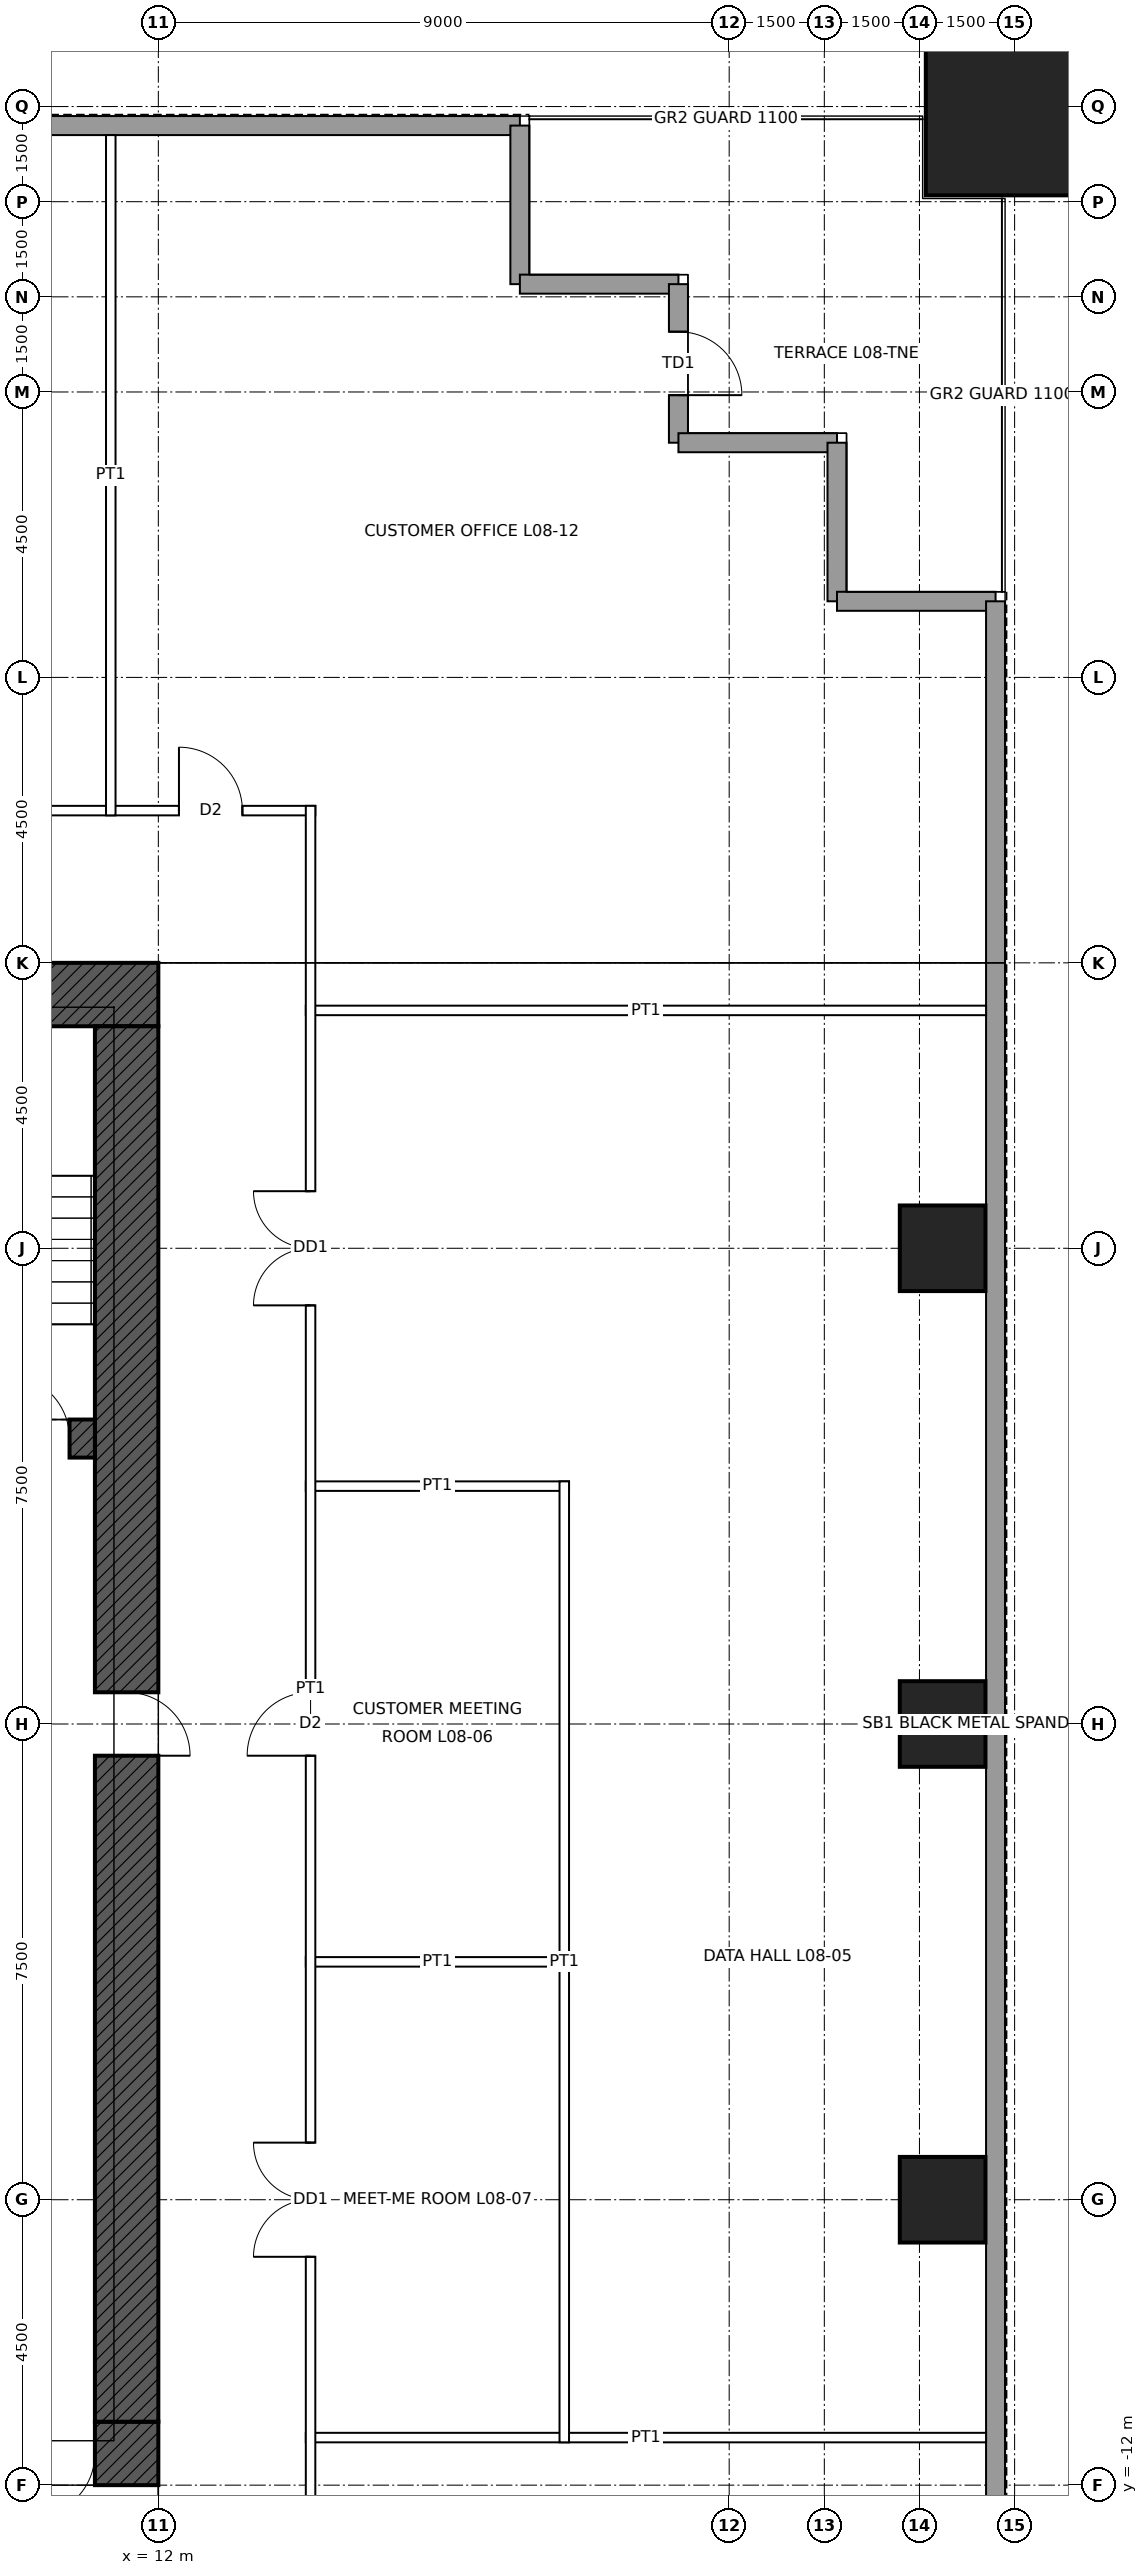
"""IFC4 building model, lengths in metres.
Left out: names, types, materials, properties, quantities, classifications, styles, units other than length and angle.
Written with IfcOpenShell. Run it as: python <this file> out.ifc"""

import sys

from ifc_helpers import new_model, si_unit, direction, frame, frame_2d, origin, origin_2d, place, context, subcontext, project, spatial, rectangle, hollow_rectangle, extrude, element, fill, save


model = new_model("IFC4")
c1 = context("Model", 3, precision=1e-05, world=origin(), true_north=direction((0.0, 1.0)))
c2 = subcontext(c1, "Body", "Model", "MODEL_VIEW")
j1 = project(units=[si_unit("LENGTHUNIT", "METRE"), si_unit("PLANEANGLEUNIT", "RADIAN")], contexts=[c1])
p1 = place(None, origin())
s1 = spatial("IfcSite", under=j1, at=p1, CompositionType="ELEMENT")
p2 = place(p1, origin())
s2 = spatial("IfcBuilding", under=s1, at=p2, CompositionType="ELEMENT")
p3 = place(p2, frame((0.0, 0.0, 43.4)))
s3 = spatial("IfcBuildingStorey", under=s2, at=p3, CompositionType="ELEMENT", Elevation=43.4)
p4 = place(p3, frame((25.5, 25.5, 0.0), z_axis=(0.0, 0.0, 1.0), x_axis=(1.0, 0.0, 0.0)))
e1 = element("IfcColumn", 1, at=p4, inside=s3, PredefinedType="COLUMN", context=c2, shape_type="SweptSolid", body=[
    extrude(hollow_rectangle(XDim=2.8, YDim=2.8, WallThickness=0.14, at=origin_2d()), origin(), (0.0, 0.0, 1.0), 5.0),
])
for number, where, z_axis, x_axis in (
    (2, (24.365, 7.5, 0.0), (0.0, 0.0, 1.0), (1.0, 0.0, 0.0)),
    (3, (24.365, 0.0, 0.0), (0.0, 0.0, 1.0), (1.0, 0.0, 0.0)),
    (4, (24.365, -7.5, 0.0), (0.0, 0.0, 1.0), (1.0, 0.0, 0.0)),
):
    element("IfcColumn", number, at=place(p3, frame(where, z_axis=z_axis, x_axis=x_axis)), inside=s3, PredefinedType="COLUMN", context=c2, shape_type="SweptSolid", body=[
        extrude(hollow_rectangle(XDim=1.35, YDim=1.35, WallThickness=0.085, at=origin_2d()), origin(), (0.0, 0.0, 1.0), 5.0),
    ])
p5 = place(p3, frame((-12.0, 11.5, 0.0), z_axis=(0.0, 0.0, 1.0), x_axis=(1.0, 0.0, 0.0)))
e5 = element("IfcWall", 5, at=p5, inside=s3, PredefinedType="SHEAR", context=c2, shape_type="SweptSolid", body=[
    extrude(rectangle(XDim=24.0, YDim=1.0, at=frame_2d((12.0, 0.0))), origin(), (0.0, 0.0, 1.0), 5.0),
])
p6 = place(p5, frame((6.25, 0.0, 0.0)))
e6 = element("IfcOpeningElement", 6, at=p6, cuts=e5, PredefinedType="OPENING", context=c2, shape_type="SweptSolid", body=[
    extrude(rectangle(XDim=1.0, YDim=2.4, at=frame_2d((0.5, 1.2))), frame((0.0, 0.51, 0.0), z_axis=(0.0, -1.0, 0.0), x_axis=(1.0, 0.0, 0.0)), (0.0, 0.0, 1.0), 1.02),
])
p7 = place(p5, frame((16.75, 0.0, 0.0)))
e7 = element("IfcOpeningElement", 7, at=p7, cuts=e5, PredefinedType="OPENING", context=c2, shape_type="SweptSolid", body=[
    extrude(rectangle(XDim=1.0, YDim=2.4, at=frame_2d((0.5, 1.2))), frame((0.0, 0.51, 0.0), z_axis=(0.0, -1.0, 0.0), x_axis=(1.0, 0.0, 0.0)), (0.0, 0.0, 1.0), 1.02),
])
p8 = place(p3, frame((12.0, -11.5, 0.0), z_axis=(0.0, 0.0, 1.0), x_axis=(-1.0, 0.0, 0.0)))
e8 = element("IfcWall", 8, at=p8, inside=s3, PredefinedType="SHEAR", context=c2, shape_type="SweptSolid", body=[
    extrude(rectangle(XDim=24.0, YDim=1.0, at=frame_2d((12.0, 0.0))), origin(), (0.0, 0.0, 1.0), 5.0),
])
p9 = place(p8, frame((11.5, 0.0, 0.0)))
e9 = element("IfcOpeningElement", 9, at=p9, cuts=e8, PredefinedType="OPENING", context=c2, shape_type="SweptSolid", body=[
    extrude(rectangle(XDim=1.0, YDim=2.1, at=frame_2d((0.5, 1.05))), frame((0.0, 0.51, 0.0), z_axis=(0.0, -1.0, 0.0), x_axis=(1.0, 0.0, 0.0)), (0.0, 0.0, 1.0), 1.02),
])
p10 = place(p8, frame((1.0, 0.0, 0.0)))
e10 = element("IfcOpeningElement", 10, at=p10, cuts=e8, PredefinedType="OPENING", context=c2, shape_type="SweptSolid", body=[
    extrude(rectangle(XDim=1.0, YDim=2.4, at=frame_2d((0.5, 1.2))), frame((0.0, 0.51, 0.0), z_axis=(0.0, -1.0, 0.0), x_axis=(1.0, 0.0, 0.0)), (0.0, 0.0, 1.0), 1.02),
])
p11 = place(p3, frame((11.5, 11.0, 0.0), z_axis=(0.0, 0.0, 1.0), x_axis=(0.0, -1.0, 0.0)))
e11 = element("IfcWall", 11, at=p11, inside=s3, PredefinedType="SHEAR", context=c2, shape_type="SweptSolid", body=[
    extrude(rectangle(XDim=22.0, YDim=1.0, at=frame_2d((11.0, 0.0))), origin(), (0.0, 0.0, 1.0), 5.0),
])
p12 = place(p11, frame((10.5, 0.0, 0.0)))
e12 = element("IfcOpeningElement", 12, at=p12, cuts=e11, PredefinedType="OPENING", context=c2, shape_type="SweptSolid", body=[
    extrude(rectangle(XDim=1.0, YDim=2.4, at=frame_2d((0.5, 1.2))), frame((0.0, 0.51, 0.0), z_axis=(0.0, -1.0, 0.0), x_axis=(1.0, 0.0, 0.0)), (0.0, 0.0, 1.0), 1.02),
])
p13 = place(p3, frame((-11.0, 4.5, 0.0), z_axis=(0.0, 0.0, 1.0), x_axis=(1.0, 0.0, 0.0)))
e13 = element("IfcWall", 13, at=p13, inside=s3, PredefinedType="SHEAR", context=c2, shape_type="SweptSolid", body=[
    extrude(rectangle(XDim=22.0, YDim=0.6, at=frame_2d((11.0, 0.0))), origin(), (0.0, 0.0, 1.0), 5.0),
])
p14 = place(p13, frame((0.4, 0.0, 0.0)))
e14 = element("IfcOpeningElement", 14, at=p14, cuts=e13, PredefinedType="OPENING", context=c2, shape_type="SweptSolid", body=[
    extrude(rectangle(XDim=1.0, YDim=2.1, at=frame_2d((0.5, 1.05))), frame((0.0, 0.31, 0.0), z_axis=(0.0, -1.0, 0.0), x_axis=(1.0, 0.0, 0.0)), (0.0, 0.0, 1.0), 0.62),
])
p15 = place(p13, frame((20.6, 0.0, 0.0)))
e15 = element("IfcOpeningElement", 15, at=p15, cuts=e13, PredefinedType="OPENING", context=c2, shape_type="SweptSolid", body=[
    extrude(rectangle(XDim=1.0, YDim=2.1, at=frame_2d((0.5, 1.05))), frame((0.0, 0.31, 0.0), z_axis=(0.0, -1.0, 0.0), x_axis=(1.0, 0.0, 0.0)), (0.0, 0.0, 1.0), 0.62),
])
p16 = place(p3, frame((-17.7, 25.2, 0.0), z_axis=(0.0, 0.0, 1.0), x_axis=(1.0, 0.0, 0.0)))
e16 = element("IfcWall", 16, at=p16, inside=s3, PredefinedType="SOLIDWALL", context=c2, shape_type="SweptSolid", body=[
    extrude(rectangle(XDim=35.4, YDim=0.3, at=frame_2d((17.7, 0.0))), origin(), (0.0, 0.0, 1.0), 4.8),
])
for number, where, z_axis, x_axis in (
    (17, (17.7, 25.2, 0.0), (0.0, 0.0, 1.0), (0.0, -1.0, 0.0)),
    (18, (17.7, 22.7, 0.0), (0.0, 0.0, 1.0), (1.0, 0.0, 0.0)),
):
    element("IfcWall", number, at=place(p3, frame(where, z_axis=z_axis, x_axis=x_axis)), inside=s3, PredefinedType="SOLIDWALL", context=c2, shape_type="SweptSolid", body=[
        extrude(rectangle(XDim=2.5, YDim=0.3, at=frame_2d((1.25, 0.0))), origin(), (0.0, 0.0, 1.0), 4.8),
    ])
p17 = place(p3, frame((20.2, 22.7, 0.0), z_axis=(0.0, 0.0, 1.0), x_axis=(0.0, -1.0, 0.0)))
e19 = element("IfcWall", 19, at=p17, inside=s3, PredefinedType="SOLIDWALL", context=c2, shape_type="SweptSolid", body=[
    extrude(rectangle(XDim=2.5, YDim=0.3, at=frame_2d((1.25, 0.0))), origin(), (0.0, 0.0, 1.0), 4.8),
])
p18 = place(p17, frame((0.75, 0.0, 0.0)))
e20 = element("IfcOpeningElement", 20, at=p18, cuts=e19, PredefinedType="OPENING", context=c2, shape_type="SweptSolid", body=[
    extrude(rectangle(XDim=1.0, YDim=2.4, at=frame_2d((0.5, 1.2))), frame((0.0, 0.16, 0.0), z_axis=(0.0, -1.0, 0.0), x_axis=(1.0, 0.0, 0.0)), (0.0, 0.0, 1.0), 0.32),
])
for number, where, z_axis, x_axis in (
    (21, (20.2, 20.2, 0.0), (0.0, 0.0, 1.0), (1.0, 0.0, 0.0)),
    (22, (22.7, 20.2, 0.0), (0.0, 0.0, 1.0), (0.0, -1.0, 0.0)),
    (23, (22.7, 17.7, 0.0), (0.0, 0.0, 1.0), (1.0, 0.0, 0.0)),
):
    element("IfcWall", number, at=place(p3, frame(where, z_axis=z_axis, x_axis=x_axis)), inside=s3, PredefinedType="SOLIDWALL", context=c2, shape_type="SweptSolid", body=[
        extrude(rectangle(XDim=2.5, YDim=0.3, at=frame_2d((1.25, 0.0))), origin(), (0.0, 0.0, 1.0), 4.8),
    ])
p19 = place(p3, frame((25.2, 17.7, 0.0), z_axis=(0.0, 0.0, 1.0), x_axis=(0.0, -1.0, 0.0)))
e24 = element("IfcWall", 24, at=p19, inside=s3, PredefinedType="SOLIDWALL", context=c2, shape_type="SweptSolid", body=[
    extrude(rectangle(XDim=35.4, YDim=0.3, at=frame_2d((17.7, 0.0))), origin(), (0.0, 0.0, 1.0), 4.8),
])
p20 = place(p3, frame((14.325, -11.25, 0.0), z_axis=(0.0, 0.0, 1.0), x_axis=(1.0, 0.0, 0.0)))
e25 = element("IfcWall", 25, at=p20, inside=s3, PredefinedType="PARTITIONING", context=c2, shape_type="SweptSolid", body=[
    extrude(rectangle(XDim=10.725, YDim=0.15, at=frame_2d((5.363, 0.0))), origin(), (0.0, 0.0, 1.0), 3.853),
])
for number, where, z_axis, x_axis in (
    (26, (14.325, -3.75, 0.0), (0.0, 0.0, 1.0), (1.0, 0.0, 0.0)),
    (27, (14.325, 3.75, 0.0), (0.0, 0.0, 1.0), (1.0, 0.0, 0.0)),
):
    element("IfcWall", number, at=place(p3, frame(where, z_axis=z_axis, x_axis=x_axis)), inside=s3, PredefinedType="PARTITIONING", context=c2, shape_type="SweptSolid", body=[
        extrude(rectangle(XDim=4.15, YDim=0.15, at=frame_2d((2.075, 0.0))), origin(), (0.0, 0.0, 1.0), 3.853),
    ])
p21 = place(p3, frame((14.325, 11.25, 0.0), z_axis=(0.0, 0.0, 1.0), x_axis=(1.0, 0.0, 0.0)))
e28 = element("IfcWall", 28, at=p21, inside=s3, PredefinedType="PARTITIONING", context=c2, shape_type="SweptSolid", body=[
    extrude(rectangle(XDim=10.725, YDim=0.15, at=frame_2d((5.363, 0.0))), origin(), (0.0, 0.0, 1.0), 3.853),
])
p22 = place(p3, frame((-14.475, 14.4, 0.0), z_axis=(0.0, 0.0, 1.0), x_axis=(1.0, 0.0, 0.0)))
e29 = element("IfcWall", 29, at=p22, inside=s3, PredefinedType="PARTITIONING", context=c2, shape_type="SweptSolid", body=[
    extrude(rectangle(XDim=28.95, YDim=0.15, at=frame_2d((14.475, 0.0))), origin(), (0.0, 0.0, 1.0), 4.8),
])
p23 = place(p22, frame((6.475, 0.0, 0.0)))
e30 = element("IfcOpeningElement", 30, at=p23, cuts=e29, PredefinedType="OPENING", context=c2, shape_type="SweptSolid", body=[
    extrude(rectangle(XDim=1.0, YDim=2.1, at=frame_2d((0.5, 1.05))), frame((0.0, 0.085, 0.0), z_axis=(0.0, -1.0, 0.0), x_axis=(1.0, 0.0, 0.0)), (0.0, 0.0, 1.0), 0.17),
])
p24 = place(p22, frame((21.075, 0.0, 0.0)))
e31 = element("IfcOpeningElement", 31, at=p24, cuts=e29, PredefinedType="OPENING", context=c2, shape_type="SweptSolid", body=[
    extrude(rectangle(XDim=1.8, YDim=2.4, at=frame_2d((0.9, 1.2))), frame((0.0, 0.085, 0.0), z_axis=(0.0, -1.0, 0.0), x_axis=(1.0, 0.0, 0.0)), (0.0, 0.0, 1.0), 0.17),
])
p25 = place(p22, frame((13.575, 0.0, 0.0)))
e32 = element("IfcOpeningElement", 32, at=p25, cuts=e29, PredefinedType="OPENING", context=c2, shape_type="SweptSolid", body=[
    extrude(rectangle(XDim=1.8, YDim=2.4, at=frame_2d((0.9, 1.2))), frame((0.0, 0.085, 0.0), z_axis=(0.0, -1.0, 0.0), x_axis=(1.0, 0.0, 0.0)), (0.0, 0.0, 1.0), 0.17),
])
p26 = place(p22, frame((26.8, 0.0, 0.0)))
e33 = element("IfcOpeningElement", 33, at=p26, cuts=e29, PredefinedType="OPENING", context=c2, shape_type="SweptSolid", body=[
    extrude(rectangle(XDim=1.0, YDim=2.1, at=frame_2d((0.5, 1.05))), frame((0.0, 0.085, 0.0), z_axis=(0.0, -1.0, 0.0), x_axis=(1.0, 0.0, 0.0)), (0.0, 0.0, 1.0), 0.17),
])
p27 = place(p22, frame((1.15, 0.0, 0.0)))
e34 = element("IfcOpeningElement", 34, at=p27, cuts=e29, PredefinedType="OPENING", context=c2, shape_type="SweptSolid", body=[
    extrude(rectangle(XDim=1.0, YDim=2.1, at=frame_2d((0.5, 1.05))), frame((0.0, 0.085, 0.0), z_axis=(0.0, -1.0, 0.0), x_axis=(1.0, 0.0, 0.0)), (0.0, 0.0, 1.0), 0.17),
])
p28 = place(p3, frame((11.25, 14.325, 0.0), z_axis=(0.0, 0.0, 1.0), x_axis=(0.0, 1.0, 0.0)))
e35 = element("IfcWall", 35, at=p28, inside=s3, PredefinedType="PARTITIONING", context=c2, shape_type="SweptSolid", body=[
    extrude(rectangle(XDim=10.725, YDim=0.15, at=frame_2d((5.363, 0.0))), origin(), (0.0, 0.0, 1.0), 3.853),
])
p29 = place(p3, frame((14.4, -14.475, 0.0), z_axis=(0.0, 0.0, 1.0), x_axis=(0.0, 1.0, 0.0)))
e36 = element("IfcWall", 36, at=p29, inside=s3, PredefinedType="PARTITIONING", context=c2, shape_type="SweptSolid", body=[
    extrude(rectangle(XDim=28.95, YDim=0.15, at=frame_2d((14.475, 0.0))), origin(), (0.0, 0.0, 1.0), 4.8),
])
p30 = place(p29, frame((21.075, 0.0, 0.0)))
e37 = element("IfcOpeningElement", 37, at=p30, cuts=e36, PredefinedType="OPENING", context=c2, shape_type="SweptSolid", body=[
    extrude(rectangle(XDim=1.8, YDim=2.4, at=frame_2d((0.9, 1.2))), frame((0.0, 0.085, 0.0), z_axis=(0.0, -1.0, 0.0), x_axis=(1.0, 0.0, 0.0)), (0.0, 0.0, 1.0), 0.17),
])
p31 = place(p29, frame((13.975, 0.0, 0.0)))
e38 = element("IfcOpeningElement", 38, at=p31, cuts=e36, PredefinedType="OPENING", context=c2, shape_type="SweptSolid", body=[
    extrude(rectangle(XDim=1.0, YDim=2.1, at=frame_2d((0.5, 1.05))), frame((0.0, 0.085, 0.0), z_axis=(0.0, -1.0, 0.0), x_axis=(1.0, 0.0, 0.0)), (0.0, 0.0, 1.0), 0.17),
])
p32 = place(p29, frame((6.075, 0.0, 0.0)))
e39 = element("IfcOpeningElement", 39, at=p32, cuts=e36, PredefinedType="OPENING", context=c2, shape_type="SweptSolid", body=[
    extrude(rectangle(XDim=1.8, YDim=2.4, at=frame_2d((0.9, 1.2))), frame((0.0, 0.085, 0.0), z_axis=(0.0, -1.0, 0.0), x_axis=(1.0, 0.0, 0.0)), (0.0, 0.0, 1.0), 0.17),
])
p33 = place(p3, frame((18.4, -11.325, 0.0), z_axis=(0.0, 0.0, 1.0), x_axis=(0.0, 1.0, 0.0)))
e40 = element("IfcWall", 40, at=p33, inside=s3, PredefinedType="PARTITIONING", context=c2, shape_type="SweptSolid", body=[
    extrude(rectangle(XDim=15.15, YDim=0.15, at=frame_2d((7.575, 0.0))), origin(), (0.0, 0.0, 1.0), 4.8),
])
p34 = place(p18, origin())
e41 = element("IfcDoor", 41, at=p34, inside=s3, OperationType="SINGLE_SWING_RIGHT", PredefinedType="DOOR", context=c2, shape_type="SweptSolid", body=[
    extrude(rectangle(XDim=1.0, YDim=2.4, at=frame_2d((0.5, 1.2))), frame((0.0, 0.025, 0.0), z_axis=(0.0, -1.0, 0.0), x_axis=(1.0, 0.0, 0.0)), (0.0, 0.0, 1.0), 0.05),
])
fill(e20, e41)
p35 = place(p15, origin())
e42 = element("IfcDoor", 42, at=p35, inside=s3, OperationType="SINGLE_SWING_LEFT", PredefinedType="DOOR", context=c2, shape_type="SweptSolid", body=[
    extrude(rectangle(XDim=1.0, YDim=2.1, at=frame_2d((0.5, 1.05))), frame((0.0, 0.025, 0.0), z_axis=(0.0, -1.0, 0.0), x_axis=(1.0, 0.0, 0.0)), (0.0, 0.0, 1.0), 0.05),
])
fill(e15, e42)
p36 = place(p12, origin())
e43 = element("IfcDoor", 43, at=p36, inside=s3, OperationType="SINGLE_SWING_RIGHT", PredefinedType="DOOR", context=c2, shape_type="SweptSolid", body=[
    extrude(rectangle(XDim=1.0, YDim=2.4, at=frame_2d((0.5, 1.2))), frame((0.0, 0.485, 0.0), z_axis=(0.0, -1.0, 0.0), x_axis=(1.0, 0.0, 0.0)), (0.0, 0.0, 1.0), 0.05),
])
fill(e12, e43)
p37 = place(p10, origin())
e44 = element("IfcDoor", 44, at=p37, inside=s3, OperationType="SINGLE_SWING_RIGHT", PredefinedType="DOOR", context=c2, shape_type="SweptSolid", body=[
    extrude(rectangle(XDim=1.0, YDim=2.4, at=frame_2d((0.5, 1.2))), frame((0.0, 0.485, 0.0), z_axis=(0.0, -1.0, 0.0), x_axis=(1.0, 0.0, 0.0)), (0.0, 0.0, 1.0), 0.05),
])
fill(e10, e44)
p38 = place(p30, origin())
e45 = element("IfcDoor", 45, at=p38, inside=s3, OperationType="DOUBLE_DOOR_SINGLE_SWING", PredefinedType="DOOR", context=c2, shape_type="SweptSolid", body=[
    extrude(rectangle(XDim=1.8, YDim=2.4, at=frame_2d((0.9, 1.2))), frame((0.0, 0.025, 0.0), z_axis=(0.0, -1.0, 0.0), x_axis=(1.0, 0.0, 0.0)), (0.0, 0.0, 1.0), 0.05),
])
fill(e37, e45)
p39 = place(p31, origin())
e46 = element("IfcDoor", 46, at=p39, inside=s3, OperationType="SINGLE_SWING_LEFT", PredefinedType="DOOR", context=c2, shape_type="SweptSolid", body=[
    extrude(rectangle(XDim=1.0, YDim=2.1, at=frame_2d((0.5, 1.05))), frame((0.0, 0.025, 0.0), z_axis=(0.0, -1.0, 0.0), x_axis=(1.0, 0.0, 0.0)), (0.0, 0.0, 1.0), 0.05),
])
fill(e38, e46)
p40 = place(p32, origin())
e47 = element("IfcDoor", 47, at=p40, inside=s3, OperationType="DOUBLE_DOOR_SINGLE_SWING", PredefinedType="DOOR", context=c2, shape_type="SweptSolid", body=[
    extrude(rectangle(XDim=1.8, YDim=2.4, at=frame_2d((0.9, 1.2))), frame((0.0, 0.025, 0.0), z_axis=(0.0, -1.0, 0.0), x_axis=(1.0, 0.0, 0.0)), (0.0, 0.0, 1.0), 0.05),
])
fill(e39, e47)
p41 = place(p26, origin())
e48 = element("IfcDoor", 48, at=p41, inside=s3, OperationType="SINGLE_SWING_LEFT", PredefinedType="DOOR", context=c2, shape_type="SweptSolid", body=[
    extrude(rectangle(XDim=1.0, YDim=2.1, at=frame_2d((0.5, 1.05))), frame((0.0, 0.025, 0.0), z_axis=(0.0, -1.0, 0.0), x_axis=(1.0, 0.0, 0.0)), (0.0, 0.0, 1.0), 0.05),
])
fill(e33, e48)
save(model, sys.argv[1])
